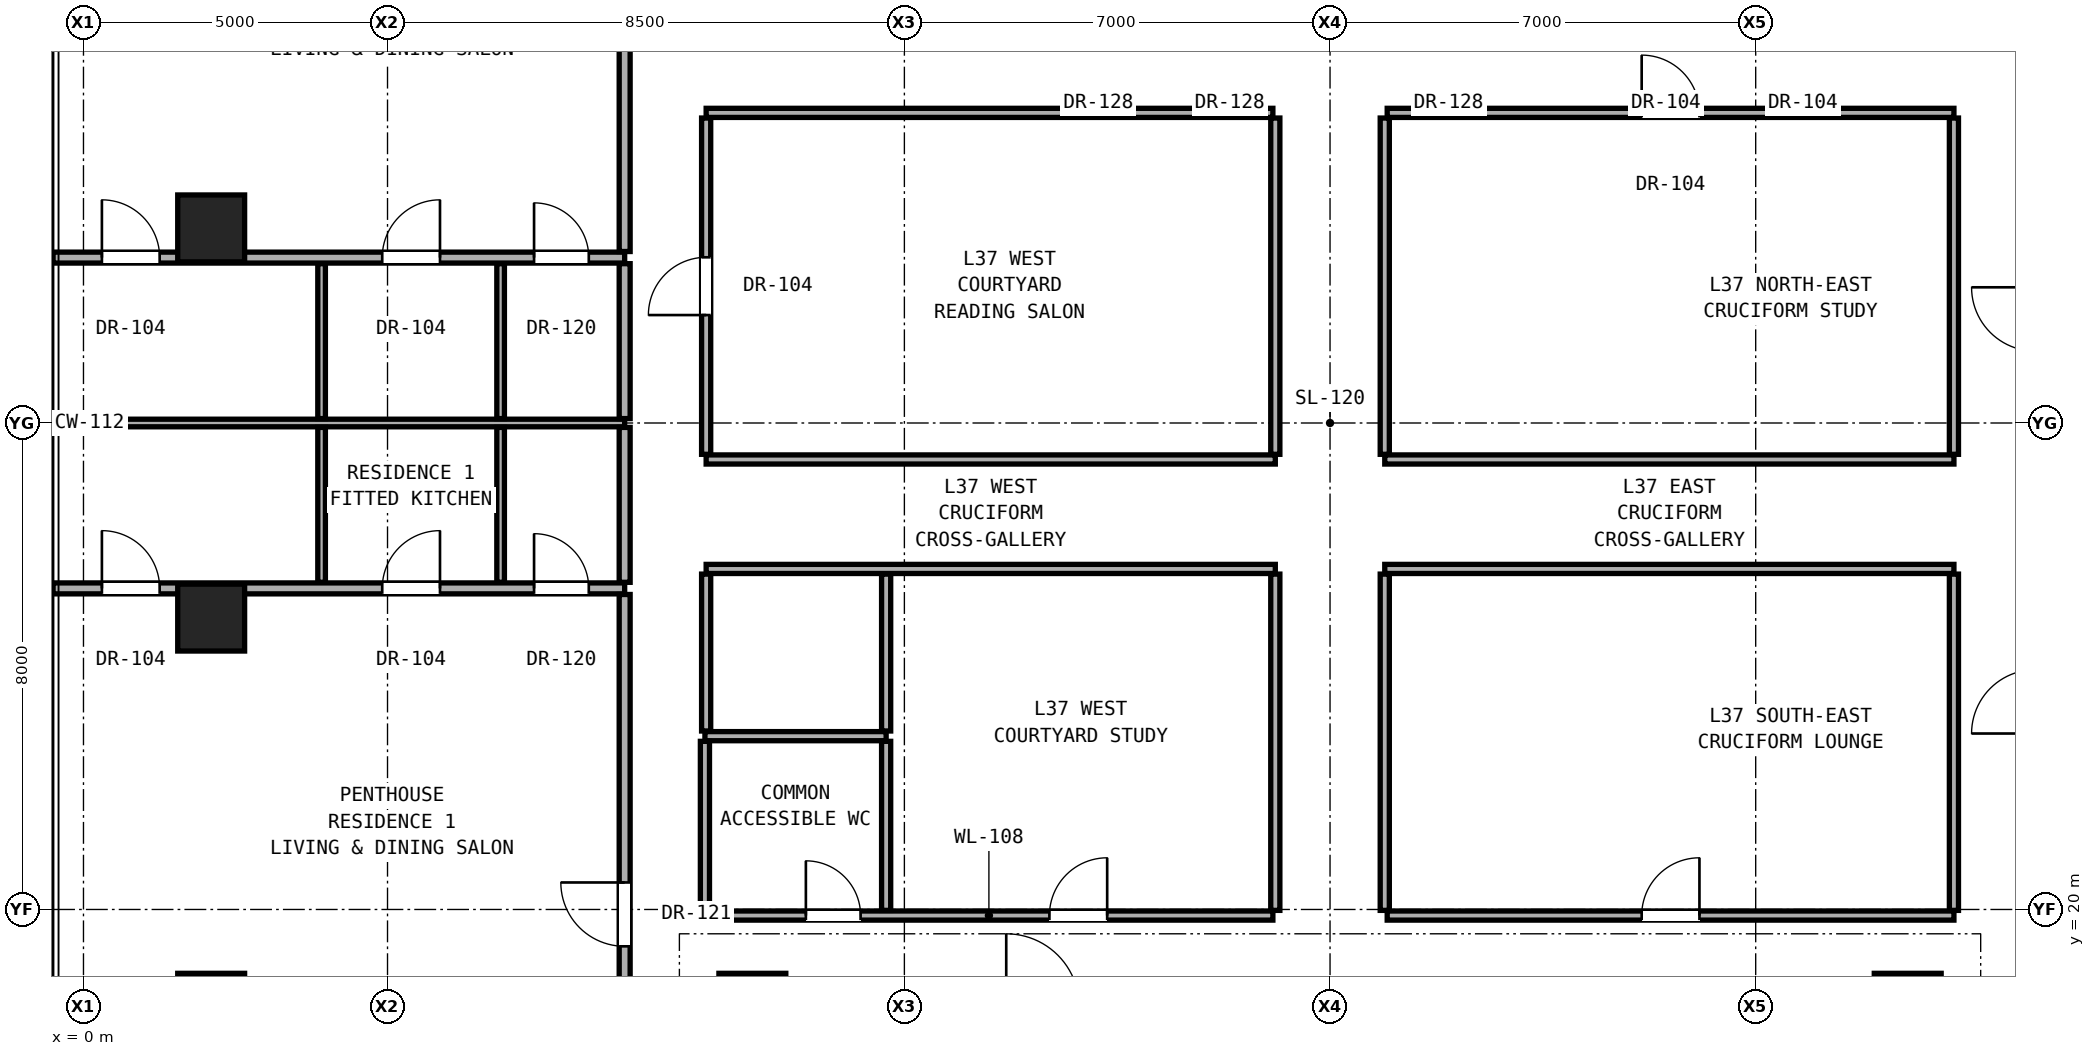
"""IFC4 building model, lengths in metres.
Left out: names, types, materials, properties, quantities, classifications, styles, units other than length and angle.
Written with IfcOpenShell. Run it as: python <this file> out.ifc"""

import sys

from ifc_helpers import new_model, si_unit, direction, frame, frame_2d, origin, origin_2d, place, context, subcontext, project, spatial, rectangle, hollow_rectangle, extrude, element, fill, save


model = new_model("IFC4")
c1 = context("Model", 3, precision=1e-05, world=origin(), true_north=direction((0.0, 1.0)))
c2 = subcontext(c1, "Body", "Model", "MODEL_VIEW")
j1 = project(units=[si_unit("LENGTHUNIT", "METRE"), si_unit("PLANEANGLEUNIT", "RADIAN")], contexts=[c1])
p1 = place(None, origin())
s1 = spatial("IfcSite", under=j1, at=p1, CompositionType="ELEMENT")
p2 = place(p1, origin())
s2 = spatial("IfcBuilding", under=s1, at=p2, CompositionType="ELEMENT")
p3 = place(p2, frame((0.0, 0.0, 131.3)))
s3 = spatial("IfcBuildingStorey", under=s2, at=p3, CompositionType="ELEMENT", Elevation=131.3)
for number, where, z_axis, x_axis in (
    (1, (11.0, 18.4, 0.0), (0.0, 0.0, 1.0), (1.0, 0.0, 0.0)),
    (2, (30.0, 18.4, 0.0), (0.0, 0.0, 1.0), (1.0, 0.0, 0.0)),
):
    element("IfcColumn", number, at=place(p3, frame(where, z_axis=z_axis, x_axis=x_axis)), inside=s3, PredefinedType="COLUMN", context=c2, shape_type="SweptSolid", body=[
        extrude(rectangle(XDim=1.1, YDim=1.1, at=origin_2d()), origin(), (0.0, 0.0, 1.0), 3.3),
    ])
for number, where, z_axis, x_axis in (
    (3, (2.1, 18.4, 0.0), (0.0, 0.0, 1.0), (1.0, 0.0, 0.0)),
    (4, (2.1, 24.8, 0.0), (0.0, 0.0, 1.0), (1.0, 0.0, 0.0)),
    (5, (2.1, 31.2, 0.0), (0.0, 0.0, 1.0), (1.0, 0.0, 0.0)),
):
    element("IfcColumn", number, at=place(p3, frame(where, z_axis=z_axis, x_axis=x_axis)), inside=s3, PredefinedType="COLUMN", context=c2, shape_type="SweptSolid", body=[
        extrude(hollow_rectangle(XDim=1.1, YDim=1.1, WallThickness=0.06, at=origin_2d()), origin(), (0.0, 0.0, 1.0), 3.3),
    ])
p4 = place(p3, frame((10.22, 19.9, 0.0), z_axis=(0.0, 0.0, 1.0), x_axis=(1.0, 0.0, 0.0)))
e6 = element("IfcWall", 6, at=p4, inside=s3, PredefinedType="PARTITIONING", context=c2, shape_type="SweptSolid", body=[
    extrude(rectangle(XDim=9.34, YDim=0.15, at=frame_2d((4.67, 0.0))), origin(), (0.0, 0.0, 1.0), 2.216),
])
p5 = place(p4, frame((1.66, 0.0, 0.0)))
e7 = element("IfcOpeningElement", 7, at=p5, cuts=e6, PredefinedType="OPENING", context=c2, shape_type="SweptSolid", body=[
    extrude(rectangle(XDim=0.9, YDim=2.1, at=frame_2d((0.45, 1.05))), frame((0.0, 0.085, 0.0), z_axis=(0.0, -1.0, 0.0), x_axis=(1.0, 0.0, 0.0)), (0.0, 0.0, 1.0), 0.17),
])
p6 = place(p4, frame((5.665, 0.0, 0.0)))
e8 = element("IfcOpeningElement", 8, at=p6, cuts=e6, PredefinedType="OPENING", context=c2, shape_type="SweptSolid", body=[
    extrude(rectangle(XDim=0.95, YDim=2.15, at=frame_2d((0.475, 1.075))), frame((0.0, 0.085, 0.0), z_axis=(0.0, -1.0, 0.0), x_axis=(1.0, 0.0, 0.0)), (0.0, 0.0, 1.0), 0.17),
])
p7 = place(p3, frame((21.44, 19.9, 0.0), z_axis=(0.0, 0.0, 1.0), x_axis=(1.0, 0.0, 0.0)))
e9 = element("IfcWall", 9, at=p7, inside=s3, PredefinedType="PARTITIONING", context=c2, shape_type="SweptSolid", body=[
    extrude(rectangle(XDim=9.32, YDim=0.15, at=frame_2d((4.66, 0.0))), origin(), (0.0, 0.0, 1.0), 2.216),
])
p8 = place(p7, frame((4.185, 0.0, 0.0)))
e10 = element("IfcOpeningElement", 10, at=p8, cuts=e9, PredefinedType="OPENING", context=c2, shape_type="SweptSolid", body=[
    extrude(rectangle(XDim=0.95, YDim=2.15, at=frame_2d((0.475, 1.075))), frame((0.0, 0.085, 0.0), z_axis=(0.0, -1.0, 0.0), x_axis=(1.0, 0.0, 0.0)), (0.0, 0.0, 1.0), 0.17),
])
p9 = place(p3, frame((10.22, 22.85, 0.0), z_axis=(0.0, 0.0, 1.0), x_axis=(1.0, 0.0, 0.0)))
e11 = element("IfcWall", 11, at=p9, inside=s3, PredefinedType="PARTITIONING", context=c2, shape_type="SweptSolid", body=[
    extrude(rectangle(XDim=2.98, YDim=0.15, at=frame_2d((1.49, 0.0))), origin(), (0.0, 0.0, 1.0), 2.216),
])
p10 = place(p3, frame((-0.5, 25.28, 0.0), z_axis=(0.0, 0.0, 1.0), x_axis=(1.0, 0.0, 0.0)))
e12 = element("IfcWall", 12, at=p10, inside=s3, PredefinedType="PARTITIONING", context=c2, shape_type="SweptSolid", body=[
    extrude(rectangle(XDim=9.4, YDim=0.18, at=frame_2d((4.7, 0.0))), origin(), (0.0, 0.0, 1.0), 2.299),
])
p11 = place(p10, frame((0.803, 0.0, 0.0)))
e13 = element("IfcOpeningElement", 13, at=p11, cuts=e12, PredefinedType="OPENING", context=c2, shape_type="SweptSolid", body=[
    extrude(rectangle(XDim=0.95, YDim=2.15, at=frame_2d((0.475, 1.075))), frame((0.0, 0.1, 0.0), z_axis=(0.0, -1.0, 0.0), x_axis=(1.0, 0.0, 0.0)), (0.0, 0.0, 1.0), 0.2),
])
p12 = place(p10, frame((5.413, 0.0, 0.0)))
e14 = element("IfcOpeningElement", 14, at=p12, cuts=e12, PredefinedType="OPENING", context=c2, shape_type="SweptSolid", body=[
    extrude(rectangle(XDim=0.95, YDim=2.15, at=frame_2d((0.475, 1.075))), frame((0.0, 0.1, 0.0), z_axis=(0.0, -1.0, 0.0), x_axis=(1.0, 0.0, 0.0)), (0.0, 0.0, 1.0), 0.2),
])
p13 = place(p10, frame((7.91, 0.0, 0.0)))
e15 = element("IfcOpeningElement", 15, at=p13, cuts=e12, PredefinedType="OPENING", context=c2, shape_type="SweptSolid", body=[
    extrude(rectangle(XDim=0.9, YDim=2.1, at=frame_2d((0.45, 1.05))), frame((0.0, 0.1, 0.0), z_axis=(0.0, -1.0, 0.0), x_axis=(1.0, 0.0, 0.0)), (0.0, 0.0, 1.0), 0.2),
])
for number, where, z_axis, x_axis in (
    (16, (10.24, 25.6, 0.0), (0.0, 0.0, 1.0), (1.0, 0.0, 0.0)),
    (17, (21.4, 25.6, 0.0), (0.0, 0.0, 1.0), (1.0, 0.0, 0.0)),
    (18, (10.24, 27.4, 0.0), (0.0, 0.0, 1.0), (1.0, 0.0, 0.0)),
    (19, (21.4, 27.4, 0.0), (0.0, 0.0, 1.0), (1.0, 0.0, 0.0)),
):
    element("IfcWall", number, at=place(p3, frame(where, z_axis=z_axis, x_axis=x_axis)), inside=s3, PredefinedType="PARTITIONING", context=c2, shape_type="SweptSolid", body=[
        extrude(rectangle(XDim=9.36, YDim=0.15, at=frame_2d((4.68, 0.0))), origin(), (0.0, 0.0, 1.0), 2.216),
    ])
p14 = place(p3, frame((-0.5, 28.0, 0.0), z_axis=(0.0, 0.0, 1.0), x_axis=(1.0, 0.0, 0.0)))
e20 = element("IfcWall", 20, at=p14, inside=s3, PredefinedType="PARTITIONING", context=c2, shape_type="SweptSolid", body=[
    extrude(rectangle(XDim=9.4, YDim=0.125, at=frame_2d((4.7, 0.0))), origin(), (0.0, 0.0, 1.0), 2.299),
])
p15 = place(p3, frame((-0.5, 30.72, 0.0), z_axis=(0.0, 0.0, 1.0), x_axis=(1.0, 0.0, 0.0)))
e21 = element("IfcWall", 21, at=p15, inside=s3, PredefinedType="PARTITIONING", context=c2, shape_type="SweptSolid", body=[
    extrude(rectangle(XDim=9.4, YDim=0.18, at=frame_2d((4.7, 0.0))), origin(), (0.0, 0.0, 1.0), 2.299),
])
p16 = place(p15, frame((0.803, 0.0, 0.0)))
e22 = element("IfcOpeningElement", 22, at=p16, cuts=e21, PredefinedType="OPENING", context=c2, shape_type="SweptSolid", body=[
    extrude(rectangle(XDim=0.95, YDim=2.15, at=frame_2d((0.475, 1.075))), frame((0.0, 0.1, 0.0), z_axis=(0.0, -1.0, 0.0), x_axis=(1.0, 0.0, 0.0)), (0.0, 0.0, 1.0), 0.2),
])
p17 = place(p15, frame((5.413, 0.0, 0.0)))
e23 = element("IfcOpeningElement", 23, at=p17, cuts=e21, PredefinedType="OPENING", context=c2, shape_type="SweptSolid", body=[
    extrude(rectangle(XDim=0.95, YDim=2.15, at=frame_2d((0.475, 1.075))), frame((0.0, 0.1, 0.0), z_axis=(0.0, -1.0, 0.0), x_axis=(1.0, 0.0, 0.0)), (0.0, 0.0, 1.0), 0.2),
])
p18 = place(p15, frame((7.91, 0.0, 0.0)))
e24 = element("IfcOpeningElement", 24, at=p18, cuts=e21, PredefinedType="OPENING", context=c2, shape_type="SweptSolid", body=[
    extrude(rectangle(XDim=0.9, YDim=2.1, at=frame_2d((0.45, 1.05))), frame((0.0, 0.1, 0.0), z_axis=(0.0, -1.0, 0.0), x_axis=(1.0, 0.0, 0.0)), (0.0, 0.0, 1.0), 0.2),
])
p19 = place(p3, frame((10.24, 33.1, 0.0), z_axis=(0.0, 0.0, 1.0), x_axis=(1.0, 0.0, 0.0)))
e25 = element("IfcWall", 25, at=p19, inside=s3, PredefinedType="PARTITIONING", context=c2, shape_type="SweptSolid", body=[
    extrude(rectangle(XDim=9.32, YDim=0.15, at=frame_2d((4.66, 0.0))), origin(), (0.0, 0.0, 1.0), 2.216),
])
p20 = place(p3, frame((21.44, 33.1, 0.0), z_axis=(0.0, 0.0, 1.0), x_axis=(1.0, 0.0, 0.0)))
e26 = element("IfcWall", 26, at=p20, inside=s3, PredefinedType="PARTITIONING", context=c2, shape_type="SweptSolid", body=[
    extrude(rectangle(XDim=9.32, YDim=0.15, at=frame_2d((4.66, 0.0))), origin(), (0.0, 0.0, 1.0), 2.216),
])
p21 = place(p20, frame((4.185, 0.0, 0.0)))
e27 = element("IfcOpeningElement", 27, at=p21, cuts=e26, PredefinedType="OPENING", context=c2, shape_type="SweptSolid", body=[
    extrude(rectangle(XDim=0.95, YDim=2.15, at=frame_2d((0.475, 1.075))), frame((0.0, 0.085, 0.0), z_axis=(0.0, -1.0, 0.0), x_axis=(1.0, 0.0, 0.0)), (0.0, 0.0, 1.0), 0.17),
])
for number, where, z_axis, x_axis in (
    (28, (3.916, 25.38, 0.0), (0.0, 0.0, 1.0), (0.0, 1.0, 0.0)),
    (29, (3.916, 28.073, 0.0), (0.0, 0.0, 1.0), (0.0, 1.0, 0.0)),
    (30, (6.86, 25.38, 0.0), (0.0, 0.0, 1.0), (0.0, 1.0, 0.0)),
    (31, (6.86, 28.073, 0.0), (0.0, 0.0, 1.0), (0.0, 1.0, 0.0)),
):
    element("IfcWall", number, at=place(p3, frame(where, z_axis=z_axis, x_axis=x_axis)), inside=s3, PredefinedType="PARTITIONING", context=c2, shape_type="SweptSolid", body=[
        extrude(rectangle(XDim=2.548, YDim=0.125, at=frame_2d((1.274, 0.0))), origin(), (0.0, 0.0, 1.0), 3.08),
    ])
p22 = place(p3, frame((8.9, 14.658, 0.0), z_axis=(0.0, 0.0, 1.0), x_axis=(0.0, 1.0, 0.0)))
e32 = element("IfcWall", 32, at=p22, inside=s3, PredefinedType="PARTITIONING", context=c2, shape_type="SweptSolid", body=[
    extrude(rectangle(XDim=10.522, YDim=0.18, at=frame_2d((5.261, 0.0))), origin(), (0.0, 0.0, 1.0), 2.299),
])
p23 = place(p22, frame((4.736, 0.0, 0.0)))
e33 = element("IfcOpeningElement", 33, at=p23, cuts=e32, PredefinedType="OPENING", context=c2, shape_type="SweptSolid", body=[
    extrude(rectangle(XDim=1.05, YDim=2.2, at=frame_2d((0.525, 1.1))), frame((0.0, 0.1, 0.0), z_axis=(0.0, -1.0, 0.0), x_axis=(1.0, 0.0, 0.0)), (0.0, 0.0, 1.0), 0.2),
])
for number, where, z_axis, x_axis in (
    (34, (8.9, 25.38, 0.0), (0.0, 0.0, 1.0), (0.0, 1.0, 0.0)),
    (35, (8.9, 28.073, 0.0), (0.0, 0.0, 1.0), (0.0, 1.0, 0.0)),
):
    element("IfcWall", number, at=place(p3, frame(where, z_axis=z_axis, x_axis=x_axis)), inside=s3, PredefinedType="PARTITIONING", context=c2, shape_type="SweptSolid", body=[
        extrude(rectangle(XDim=2.548, YDim=0.18, at=frame_2d((1.274, 0.0))), origin(), (0.0, 0.0, 1.0), 3.08),
    ])
p24 = place(p3, frame((8.9, 30.82, 0.0), z_axis=(0.0, 0.0, 1.0), x_axis=(0.0, 1.0, 0.0)))
e36 = element("IfcWall", 36, at=p24, inside=s3, PredefinedType="PARTITIONING", context=c2, shape_type="SweptSolid", body=[
    extrude(rectangle(XDim=10.522, YDim=0.18, at=frame_2d((5.261, 0.0))), origin(), (0.0, 0.0, 1.0), 2.299),
])
p25 = place(p24, frame((4.736, 0.0, 0.0)))
e37 = element("IfcOpeningElement", 37, at=p25, cuts=e36, PredefinedType="OPENING", context=c2, shape_type="SweptSolid", body=[
    extrude(rectangle(XDim=1.05, YDim=2.2, at=frame_2d((0.525, 1.1))), frame((0.0, 0.1, 0.0), z_axis=(0.0, -1.0, 0.0), x_axis=(1.0, 0.0, 0.0)), (0.0, 0.0, 1.0), 0.2),
])
p26 = place(p3, frame((10.22, 19.985, 0.0), z_axis=(0.0, 0.0, 1.0), x_axis=(0.0, 1.0, 0.0)))
e38 = element("IfcWall", 38, at=p26, inside=s3, PredefinedType="PARTITIONING", context=c2, shape_type="SweptSolid", body=[
    extrude(rectangle(XDim=2.78, YDim=0.15, at=frame_2d((1.39, 0.0))), origin(), (0.0, 0.0, 1.0), 3.08),
])
p27 = place(p3, frame((10.24, 22.935, 0.0), z_axis=(0.0, 0.0, 1.0), x_axis=(0.0, 1.0, 0.0)))
e39 = element("IfcWall", 39, at=p27, inside=s3, PredefinedType="PARTITIONING", context=c2, shape_type="SweptSolid", body=[
    extrude(rectangle(XDim=2.58, YDim=0.15, at=frame_2d((1.29, 0.0))), origin(), (0.0, 0.0, 1.0), 2.299),
])
p28 = place(p3, frame((10.24, 27.485, 0.0), z_axis=(0.0, 0.0, 1.0), x_axis=(0.0, 1.0, 0.0)))
e40 = element("IfcWall", 40, at=p28, inside=s3, PredefinedType="PARTITIONING", context=c2, shape_type="SweptSolid", body=[
    extrude(rectangle(XDim=5.53, YDim=0.15, at=frame_2d((2.765, 0.0))), origin(), (0.0, 0.0, 1.0), 2.299),
])
p29 = place(p28, frame((2.29, 0.0, 0.0)))
e41 = element("IfcOpeningElement", 41, at=p29, cuts=e40, PredefinedType="OPENING", context=c2, shape_type="SweptSolid", body=[
    extrude(rectangle(XDim=0.95, YDim=2.15, at=frame_2d((0.475, 1.075))), frame((0.0, 0.085, 0.0), z_axis=(0.0, -1.0, 0.0), x_axis=(1.0, 0.0, 0.0)), (0.0, 0.0, 1.0), 0.17),
])
p30 = place(p3, frame((13.2, 19.985, 0.0), z_axis=(0.0, 0.0, 1.0), x_axis=(0.0, 1.0, 0.0)))
e42 = element("IfcWall", 42, at=p30, inside=s3, PredefinedType="PARTITIONING", context=c2, shape_type="SweptSolid", body=[
    extrude(rectangle(XDim=2.78, YDim=0.15, at=frame_2d((1.39, 0.0))), origin(), (0.0, 0.0, 1.0), 3.08),
])
p31 = place(p3, frame((13.2, 22.935, 0.0), z_axis=(0.0, 0.0, 1.0), x_axis=(0.0, 1.0, 0.0)))
e43 = element("IfcWall", 43, at=p31, inside=s3, PredefinedType="PARTITIONING", context=c2, shape_type="SweptSolid", body=[
    extrude(rectangle(XDim=2.58, YDim=0.15, at=frame_2d((1.29, 0.0))), origin(), (0.0, 0.0, 1.0), 2.216),
])
for number, where, z_axis, x_axis in (
    (44, (19.6, 19.985, 0.0), (0.0, 0.0, 1.0), (0.0, 1.0, 0.0)),
    (45, (19.6, 27.485, 0.0), (0.0, 0.0, 1.0), (0.0, 1.0, 0.0)),
    (46, (21.4, 19.985, 0.0), (0.0, 0.0, 1.0), (0.0, 1.0, 0.0)),
    (47, (21.4, 27.485, 0.0), (0.0, 0.0, 1.0), (0.0, 1.0, 0.0)),
):
    element("IfcWall", number, at=place(p3, frame(where, z_axis=z_axis, x_axis=x_axis)), inside=s3, PredefinedType="PARTITIONING", context=c2, shape_type="SweptSolid", body=[
        extrude(rectangle(XDim=5.53, YDim=0.15, at=frame_2d((2.765, 0.0))), origin(), (0.0, 0.0, 1.0), 2.216),
    ])
for number, where, z_axis, x_axis in (
    (48, (30.76, 19.985, 0.0), (0.0, 0.0, 1.0), (0.0, 1.0, 0.0)),
    (49, (30.76, 27.485, 0.0), (0.0, 0.0, 1.0), (0.0, 1.0, 0.0)),
):
    element("IfcWall", number, at=place(p3, frame(where, z_axis=z_axis, x_axis=x_axis)), inside=s3, PredefinedType="PARTITIONING", context=c2, shape_type="SweptSolid", body=[
        extrude(rectangle(XDim=5.53, YDim=0.15, at=frame_2d((2.765, 0.0))), origin(), (0.0, 0.0, 1.0), 2.299),
    ])
p32 = place(p5, origin())
e50 = element("IfcDoor", 50, at=p32, inside=s3, OperationType="SINGLE_SWING_LEFT", PredefinedType="DOOR", context=c2, shape_type="SweptSolid", body=[
    extrude(rectangle(XDim=0.9, YDim=2.1, at=frame_2d((0.45, 1.05))), frame((0.0, 0.025, 0.0), z_axis=(0.0, -1.0, 0.0), x_axis=(1.0, 0.0, 0.0)), (0.0, 0.0, 1.0), 0.05),
])
fill(e7, e50)
p33 = place(p23, origin())
e51 = element("IfcDoor", 51, at=p33, inside=s3, OperationType="SINGLE_SWING_RIGHT", PredefinedType="DOOR", context=c2, shape_type="SweptSolid", body=[
    extrude(rectangle(XDim=1.05, YDim=2.2, at=frame_2d((0.525, 1.1))), frame((0.0, 0.025, 0.0), z_axis=(0.0, -1.0, 0.0), x_axis=(1.0, 0.0, 0.0)), (0.0, 0.0, 1.0), 0.05),
])
fill(e33, e51)
p34 = place(p11, origin())
e52 = element("IfcDoor", 52, at=p34, inside=s3, OperationType="SINGLE_SWING_LEFT", PredefinedType="DOOR", context=c2, shape_type="SweptSolid", body=[
    extrude(rectangle(XDim=0.95, YDim=2.15, at=frame_2d((0.475, 1.075))), frame((0.0, 0.025, 0.0), z_axis=(0.0, -1.0, 0.0), x_axis=(1.0, 0.0, 0.0)), (0.0, 0.0, 1.0), 0.05),
])
fill(e13, e52)
p35 = place(p12, origin())
e53 = element("IfcDoor", 53, at=p35, inside=s3, OperationType="SINGLE_SWING_RIGHT", PredefinedType="DOOR", context=c2, shape_type="SweptSolid", body=[
    extrude(rectangle(XDim=0.95, YDim=2.15, at=frame_2d((0.475, 1.075))), frame((0.0, 0.025, 0.0), z_axis=(0.0, -1.0, 0.0), x_axis=(1.0, 0.0, 0.0)), (0.0, 0.0, 1.0), 0.05),
])
fill(e14, e53)
p36 = place(p13, origin())
e54 = element("IfcDoor", 54, at=p36, inside=s3, OperationType="SINGLE_SWING_LEFT", PredefinedType="DOOR", context=c2, shape_type="SweptSolid", body=[
    extrude(rectangle(XDim=0.9, YDim=2.1, at=frame_2d((0.45, 1.05))), frame((0.0, 0.025, 0.0), z_axis=(0.0, -1.0, 0.0), x_axis=(1.0, 0.0, 0.0)), (0.0, 0.0, 1.0), 0.05),
])
fill(e15, e54)
p37 = place(p16, origin())
e55 = element("IfcDoor", 55, at=p37, inside=s3, OperationType="SINGLE_SWING_LEFT", PredefinedType="DOOR", context=c2, shape_type="SweptSolid", body=[
    extrude(rectangle(XDim=0.95, YDim=2.15, at=frame_2d((0.475, 1.075))), frame((0.0, 0.025, 0.0), z_axis=(0.0, -1.0, 0.0), x_axis=(1.0, 0.0, 0.0)), (0.0, 0.0, 1.0), 0.05),
])
fill(e22, e55)
p38 = place(p17, origin())
e56 = element("IfcDoor", 56, at=p38, inside=s3, OperationType="SINGLE_SWING_RIGHT", PredefinedType="DOOR", context=c2, shape_type="SweptSolid", body=[
    extrude(rectangle(XDim=0.95, YDim=2.15, at=frame_2d((0.475, 1.075))), frame((0.0, 0.025, 0.0), z_axis=(0.0, -1.0, 0.0), x_axis=(1.0, 0.0, 0.0)), (0.0, 0.0, 1.0), 0.05),
])
fill(e23, e56)
p39 = place(p18, origin())
e57 = element("IfcDoor", 57, at=p39, inside=s3, OperationType="SINGLE_SWING_LEFT", PredefinedType="DOOR", context=c2, shape_type="SweptSolid", body=[
    extrude(rectangle(XDim=0.9, YDim=2.1, at=frame_2d((0.45, 1.05))), frame((0.0, 0.025, 0.0), z_axis=(0.0, -1.0, 0.0), x_axis=(1.0, 0.0, 0.0)), (0.0, 0.0, 1.0), 0.05),
])
fill(e24, e57)
p40 = place(p6, origin())
e58 = element("IfcDoor", 58, at=p40, inside=s3, OperationType="SINGLE_SWING_RIGHT", PredefinedType="DOOR", context=c2, shape_type="SweptSolid", body=[
    extrude(rectangle(XDim=0.95, YDim=2.15, at=frame_2d((0.475, 1.075))), frame((0.0, 0.025, 0.0), z_axis=(0.0, -1.0, 0.0), x_axis=(1.0, 0.0, 0.0)), (0.0, 0.0, 1.0), 0.05),
])
fill(e8, e58)
p41 = place(p29, origin())
e59 = element("IfcDoor", 59, at=p41, inside=s3, OperationType="SINGLE_SWING_LEFT", PredefinedType="DOOR", context=c2, shape_type="SweptSolid", body=[
    extrude(rectangle(XDim=0.95, YDim=2.15, at=frame_2d((0.475, 1.075))), frame((0.0, 0.025, 0.0), z_axis=(0.0, -1.0, 0.0), x_axis=(1.0, 0.0, 0.0)), (0.0, 0.0, 1.0), 0.05),
])
fill(e41, e59)
p42 = place(p8, origin())
e60 = element("IfcDoor", 60, at=p42, inside=s3, OperationType="SINGLE_SWING_RIGHT", PredefinedType="DOOR", context=c2, shape_type="SweptSolid", body=[
    extrude(rectangle(XDim=0.95, YDim=2.15, at=frame_2d((0.475, 1.075))), frame((0.0, 0.025, 0.0), z_axis=(0.0, -1.0, 0.0), x_axis=(1.0, 0.0, 0.0)), (0.0, 0.0, 1.0), 0.05),
])
fill(e10, e60)
p43 = place(p21, origin())
e61 = element("IfcDoor", 61, at=p43, inside=s3, OperationType="SINGLE_SWING_LEFT", PredefinedType="DOOR", context=c2, shape_type="SweptSolid", body=[
    extrude(rectangle(XDim=0.95, YDim=2.15, at=frame_2d((0.475, 1.075))), frame((0.0, 0.025, 0.0), z_axis=(0.0, -1.0, 0.0), x_axis=(1.0, 0.0, 0.0)), (0.0, 0.0, 1.0), 0.05),
])
fill(e27, e61)
save(model, sys.argv[1])
